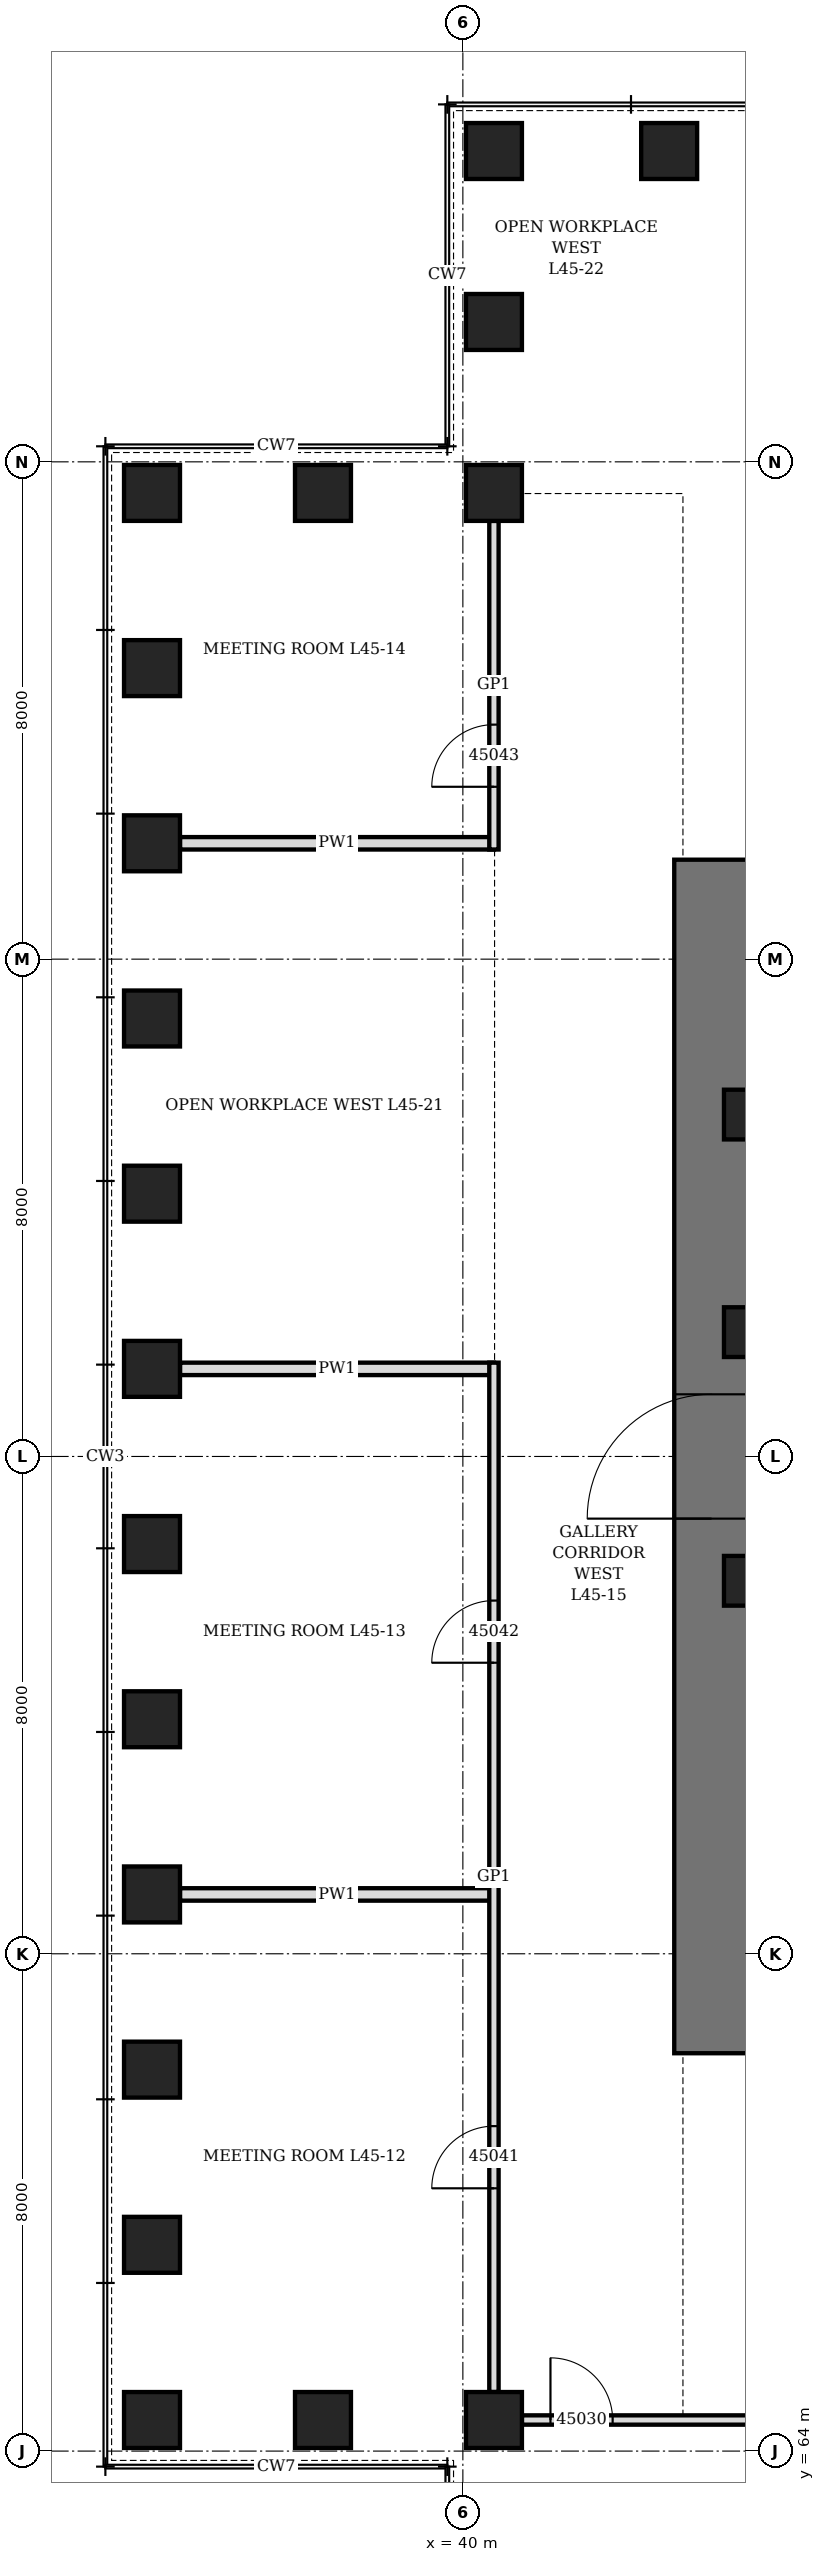
"""IFC4 building model, lengths in metres.
Left out: names, types, materials, properties, quantities, classifications, styles, units other than length and angle.
Written with IfcOpenShell. Run it as: python <this file> out.ifc"""

import sys

from ifc_helpers import new_model, si_unit, direction, frame, frame_2d, origin, origin_2d, place, context, subcontext, project, spatial, rectangle, hollow_rectangle, extrude, element, fill, save


model = new_model("IFC4")
c1 = context("Model", 3, precision=1e-05, world=origin(), true_north=direction((0.0, 1.0)))
c2 = subcontext(c1, "Body", "Model", "MODEL_VIEW")
j1 = project(units=[si_unit("LENGTHUNIT", "METRE"), si_unit("PLANEANGLEUNIT", "RADIAN")], contexts=[c1])
p1 = place(None, origin())
s1 = spatial("IfcSite", under=j1, at=p1, CompositionType="ELEMENT")
p2 = place(p1, origin())
s2 = spatial("IfcBuilding", under=s1, at=p2, CompositionType="ELEMENT")
p3 = place(p2, frame((0.0, 0.0, 202.3)))
s3 = spatial("IfcBuildingStorey", under=s2, at=p3, CompositionType="ELEMENT", Elevation=202.3)
for number, where, z_axis, x_axis in (
    (1, (43.318, 101.0, 0.0), (0.0, 0.0, 1.0), (1.0, 0.0, 0.0)),
    (2, (40.5, 101.0, 0.0), (0.0, 0.0, 1.0), (0.0, 1.0, 0.0)),
    (3, (40.5, 98.25, 0.0), (0.0, 0.0, 1.0), (0.0, 1.0, 0.0)),
    (4, (40.5, 95.5, 0.0), (0.0, 0.0, 1.0), (1.0, 0.0, 0.0)),
    (5, (37.75, 95.5, 0.0), (0.0, 0.0, 1.0), (1.0, 0.0, 0.0)),
    (6, (35.0, 95.5, 0.0), (0.0, 0.0, 1.0), (0.0, 1.0, 0.0)),
    (7, (35.0, 92.682, 0.0), (0.0, 0.0, 1.0), (0.0, 1.0, 0.0)),
    (8, (35.0, 89.864, 0.0), (0.0, 0.0, 1.0), (0.0, 1.0, 0.0)),
    (9, (35.0, 87.045, 0.0), (0.0, 0.0, 1.0), (0.0, 1.0, 0.0)),
    (10, (35.0, 84.227, 0.0), (0.0, 0.0, 1.0), (0.0, 1.0, 0.0)),
    (11, (35.0, 81.409, 0.0), (0.0, 0.0, 1.0), (0.0, 1.0, 0.0)),
    (12, (35.0, 78.591, 0.0), (0.0, 0.0, 1.0), (0.0, 1.0, 0.0)),
    (13, (35.0, 75.773, 0.0), (0.0, 0.0, 1.0), (0.0, 1.0, 0.0)),
    (14, (35.0, 72.955, 0.0), (0.0, 0.0, 1.0), (0.0, 1.0, 0.0)),
    (15, (35.0, 70.136, 0.0), (0.0, 0.0, 1.0), (0.0, 1.0, 0.0)),
    (16, (35.0, 67.318, 0.0), (0.0, 0.0, 1.0), (0.0, 1.0, 0.0)),
    (17, (35.0, 64.5, 0.0), (0.0, 0.0, 1.0), (1.0, 0.0, 0.0)),
    (18, (37.75, 64.5, 0.0), (0.0, 0.0, 1.0), (1.0, 0.0, 0.0)),
    (19, (40.5, 64.5, 0.0), (0.0, 0.0, 1.0), (0.0, 1.0, 0.0)),
):
    element("IfcColumn", number, at=place(p3, frame(where, z_axis=z_axis, x_axis=x_axis)), inside=s3, PredefinedType="COLUMN", context=c2, shape_type="SweptSolid", body=[
        extrude(hollow_rectangle(XDim=0.9, YDim=0.9, WallThickness=0.12, at=origin_2d()), origin(), (0.0, 0.0, 1.0), 4.2),
    ])
p4 = place(p3, frame((44.0, 70.4, 0.0), z_axis=(0.0, 0.0, 1.0), x_axis=(0.0, 1.0, 0.0)))
e20 = element("IfcWall", 20, at=p4, inside=s3, PredefinedType="SHEAR", context=c2, shape_type="SweptSolid", body=[
    extrude(rectangle(XDim=19.2, YDim=1.2, at=frame_2d((9.6, 0.0))), origin(), (0.0, 0.0, 1.0), 4.2),
])
p5 = place(p4, frame((8.6, 0.0, 0.0)))
e21 = element("IfcOpeningElement", 21, at=p5, cuts=e20, PredefinedType="OPENING", context=c2, shape_type="SweptSolid", body=[
    extrude(rectangle(XDim=2.0, YDim=2.4, at=frame_2d((1.0, 1.2))), frame((0.0, 0.61, 0.0), z_axis=(0.0, -1.0, 0.0), x_axis=(1.0, 0.0, 0.0)), (0.0, 0.0, 1.0), 1.22),
])
for number, where, z_axis, x_axis in (
    (22, (44.6, 78.0, 0.0), (0.0, 0.0, 1.0), (1.0, 0.0, 0.0)),
    (23, (44.6, 82.0, 0.0), (0.0, 0.0, 1.0), (1.0, 0.0, 0.0)),
    (24, (44.6, 85.5, 0.0), (0.0, 0.0, 1.0), (1.0, 0.0, 0.0)),
):
    element("IfcColumn", number, at=place(p3, frame(where, z_axis=z_axis, x_axis=x_axis)), inside=s3, PredefinedType="COLUMN", context=c2, shape_type="SweptSolid", body=[
        extrude(hollow_rectangle(XDim=0.8, YDim=0.8, WallThickness=0.1, at=origin_2d()), origin(), (0.0, 0.0, 1.0), 4.2),
    ])
for number, where, z_axis, x_axis in (
    (25, (35.45, 72.955, 0.0), (0.0, 0.0, 1.0), (1.0, 0.0, 0.0)),
    (26, (35.45, 81.409, 0.0), (0.0, 0.0, 1.0), (1.0, 0.0, 0.0)),
    (27, (35.45, 89.864, 0.0), (0.0, 0.0, 1.0), (1.0, 0.0, 0.0)),
):
    element("IfcWall", number, at=place(p3, frame(where, z_axis=z_axis, x_axis=x_axis)), inside=s3, PredefinedType="PARTITIONING", context=c2, shape_type="SweptSolid", body=[
        extrude(rectangle(XDim=5.05, YDim=0.2, at=frame_2d((2.525, 0.0))), origin(), (0.0, 0.0, 1.0), 3.428),
    ])
p6 = place(p3, frame((40.95, 64.5, 0.0), z_axis=(0.0, 0.0, 1.0), x_axis=(1.0, 0.0, 0.0)))
e28 = element("IfcWall", 28, at=p6, inside=s3, PredefinedType="PARTITIONING", context=c2, shape_type="SweptSolid", body=[
    extrude(rectangle(XDim=8.104, YDim=0.15, at=frame_2d((4.052, 0.0))), origin(), (0.0, 0.0, 1.0), 4.04),
])
p7 = place(p6, frame((0.459, 0.0, 0.0)))
e29 = element("IfcOpeningElement", 29, at=p7, cuts=e28, PredefinedType="OPENING", context=c2, shape_type="SweptSolid", body=[
    extrude(rectangle(XDim=1.0, YDim=2.4, at=frame_2d((0.5, 1.2))), frame((0.0, 0.085, 0.0), z_axis=(0.0, -1.0, 0.0), x_axis=(1.0, 0.0, 0.0)), (0.0, 0.0, 1.0), 0.17),
])
p8 = place(p6, frame((6.095, 0.0, 0.0)))
e30 = element("IfcOpeningElement", 30, at=p8, cuts=e28, PredefinedType="OPENING", context=c2, shape_type="SweptSolid", body=[
    extrude(rectangle(XDim=1.0, YDim=2.4, at=frame_2d((0.5, 1.2))), frame((0.0, 0.085, 0.0), z_axis=(0.0, -1.0, 0.0), x_axis=(1.0, 0.0, 0.0)), (0.0, 0.0, 1.0), 0.17),
])
p9 = place(p3, frame((40.5, 64.95, 0.0), z_axis=(0.0, 0.0, 1.0), x_axis=(0.0, 1.0, 0.0)))
e31 = element("IfcWall", 31, at=p9, inside=s3, PredefinedType="PARTITIONING", context=c2, shape_type="SweptSolid", body=[
    extrude(rectangle(XDim=16.559, YDim=0.15, at=frame_2d((8.28, 0.0))), origin(), (0.0, 0.0, 1.0), 4.04),
])
p10 = place(p9, frame((3.277, 0.0, 0.0)))
e32 = element("IfcOpeningElement", 32, at=p10, cuts=e31, PredefinedType="OPENING", context=c2, shape_type="SweptSolid", body=[
    extrude(rectangle(XDim=1.0, YDim=2.4, at=frame_2d((0.5, 1.2))), frame((0.0, 0.085, 0.0), z_axis=(0.0, -1.0, 0.0), x_axis=(1.0, 0.0, 0.0)), (0.0, 0.0, 1.0), 0.17),
])
p11 = place(p9, frame((11.732, 0.0, 0.0)))
e33 = element("IfcOpeningElement", 33, at=p11, cuts=e31, PredefinedType="OPENING", context=c2, shape_type="SweptSolid", body=[
    extrude(rectangle(XDim=1.0, YDim=2.4, at=frame_2d((0.5, 1.2))), frame((0.0, 0.085, 0.0), z_axis=(0.0, -1.0, 0.0), x_axis=(1.0, 0.0, 0.0)), (0.0, 0.0, 1.0), 0.17),
])
p12 = place(p3, frame((40.5, 89.764, 0.0), z_axis=(0.0, 0.0, 1.0), x_axis=(0.0, 1.0, 0.0)))
e34 = element("IfcWall", 34, at=p12, inside=s3, PredefinedType="PARTITIONING", context=c2, shape_type="SweptSolid", body=[
    extrude(rectangle(XDim=5.286, YDim=0.15, at=frame_2d((2.643, 0.0))), origin(), (0.0, 0.0, 1.0), 4.04),
])
p13 = place(p12, frame((1.009, 0.0, 0.0)))
e35 = element("IfcOpeningElement", 35, at=p13, cuts=e34, PredefinedType="OPENING", context=c2, shape_type="SweptSolid", body=[
    extrude(rectangle(XDim=1.0, YDim=2.4, at=frame_2d((0.5, 1.2))), frame((0.0, 0.085, 0.0), z_axis=(0.0, -1.0, 0.0), x_axis=(1.0, 0.0, 0.0)), (0.0, 0.0, 1.0), 0.17),
])
p14 = place(p5, origin())
e36 = element("IfcDoor", 36, at=p14, inside=s3, OperationType="DOUBLE_DOOR_SINGLE_SWING", PredefinedType="DOOR", context=c2, shape_type="SweptSolid", body=[
    extrude(rectangle(XDim=2.0, YDim=2.4, at=frame_2d((1.0, 1.2))), frame((0.0, 0.35, 0.0), z_axis=(0.0, -1.0, 0.0), x_axis=(1.0, 0.0, 0.0)), (0.0, 0.0, 1.0), 0.7),
])
fill(e21, e36)
p15 = place(p7, origin())
e37 = element("IfcDoor", 37, at=p15, inside=s3, OperationType="SINGLE_SWING_RIGHT", PredefinedType="DOOR", context=c2, shape_type="SweptSolid", body=[
    extrude(rectangle(XDim=1.0, YDim=2.4, at=frame_2d((0.5, 1.2))), frame((0.0, 0.075, 0.0), z_axis=(0.0, -1.0, 0.0), x_axis=(1.0, 0.0, 0.0)), (0.0, 0.0, 1.0), 0.149),
])
fill(e29, e37)
p16 = place(p10, origin())
e38 = element("IfcDoor", 38, at=p16, inside=s3, OperationType="SINGLE_SWING_RIGHT", PredefinedType="DOOR", context=c2, shape_type="SweptSolid", body=[
    extrude(rectangle(XDim=1.0, YDim=2.4, at=frame_2d((0.5, 1.2))), frame((0.0, 0.075, 0.0), z_axis=(0.0, -1.0, 0.0), x_axis=(1.0, 0.0, 0.0)), (0.0, 0.0, 1.0), 0.149),
])
fill(e32, e38)
p17 = place(p11, origin())
e39 = element("IfcDoor", 39, at=p17, inside=s3, OperationType="SINGLE_SWING_RIGHT", PredefinedType="DOOR", context=c2, shape_type="SweptSolid", body=[
    extrude(rectangle(XDim=1.0, YDim=2.4, at=frame_2d((0.5, 1.2))), frame((0.0, 0.075, 0.0), z_axis=(0.0, -1.0, 0.0), x_axis=(1.0, 0.0, 0.0)), (0.0, 0.0, 1.0), 0.149),
])
fill(e33, e39)
p18 = place(p13, origin())
e40 = element("IfcDoor", 40, at=p18, inside=s3, OperationType="SINGLE_SWING_RIGHT", PredefinedType="DOOR", context=c2, shape_type="SweptSolid", body=[
    extrude(rectangle(XDim=1.0, YDim=2.4, at=frame_2d((0.5, 1.2))), frame((0.0, 0.075, 0.0), z_axis=(0.0, -1.0, 0.0), x_axis=(1.0, 0.0, 0.0)), (0.0, 0.0, 1.0), 0.149),
])
fill(e35, e40)
save(model, sys.argv[1])
